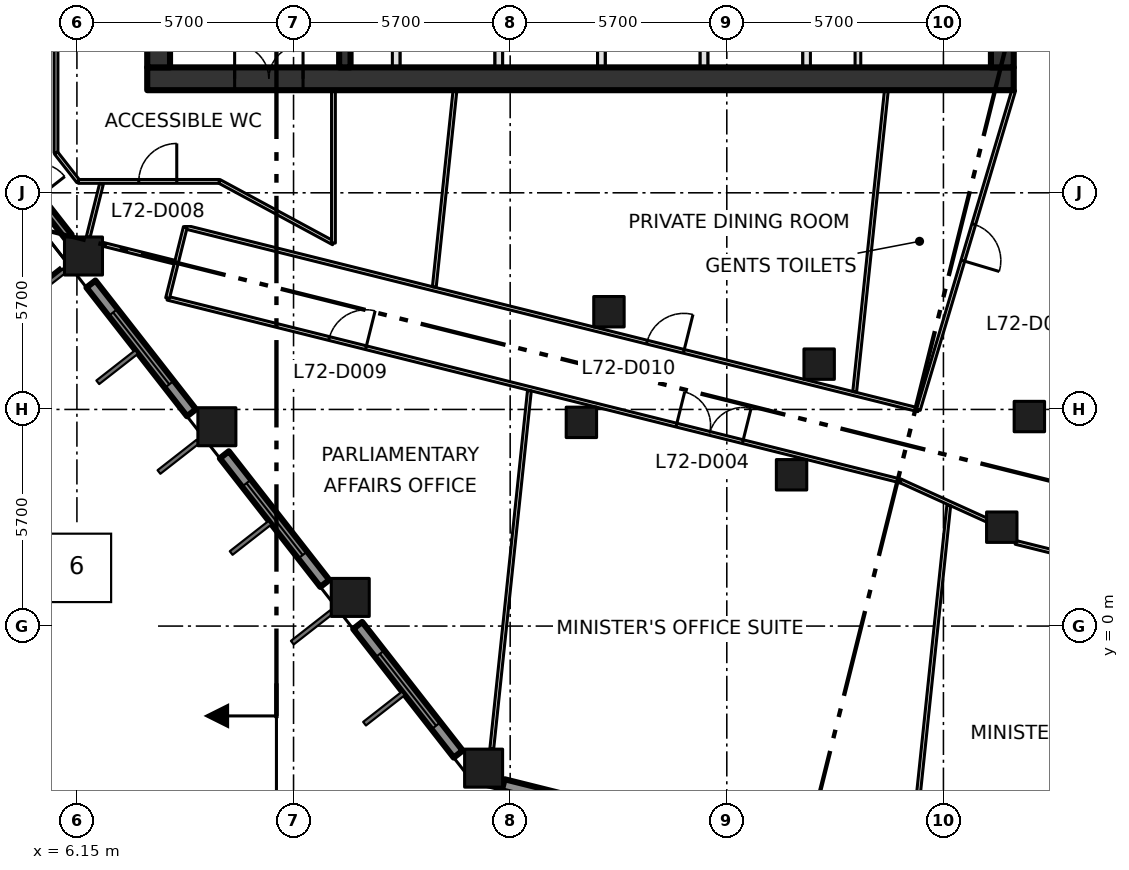
"""IFC4 building model, lengths in metres.
Left out: names, types, materials, properties, quantities, classifications, styles, units other than length and angle.
Written with IfcOpenShell. Run it as: python <this file> out.ifc"""

import sys

from ifc_helpers import new_model, si_unit, direction, frame, frame_2d, origin, origin_2d, place, context, subcontext, project, spatial, rectangle, extrude, element, fill, save


model = new_model("IFC4")
c1 = context("Model", 3, precision=1e-05, world=origin(), true_north=direction((0.0, 1.0)))
c2 = subcontext(c1, "Body", "Model", "MODEL_VIEW")
j1 = project(units=[si_unit("LENGTHUNIT", "METRE"), si_unit("PLANEANGLEUNIT", "RADIAN")], contexts=[c1])
p1 = place(None, origin())
s1 = spatial("IfcSite", under=j1, at=p1, CompositionType="ELEMENT")
p2 = place(p1, origin())
s2 = spatial("IfcBuilding", under=s1, at=p2, CompositionType="ELEMENT")
p3 = place(p2, frame((0.0, 0.0, 315.0)))
s3 = spatial("IfcBuildingStorey", under=s2, at=p3, CompositionType="ELEMENT", Elevation=315.0)
for number, where, z_axis, x_axis in (
    (1, (16.851, -3.738, 0.0), (0.0, 0.0, 1.0), (1.0, 0.0, 0.0)),
    (2, (13.342, 0.754, 0.0), (0.0, 0.0, 1.0), (1.0, 0.0, 0.0)),
    (3, (9.833, 5.245, 0.0), (0.0, 0.0, 1.0), (1.0, 0.0, 0.0)),
    (4, (6.323, 9.737, 0.0), (0.0, 0.0, 1.0), (1.0, 0.0, 0.0)),
):
    element("IfcColumn", number, at=place(p3, frame(where, z_axis=z_axis, x_axis=x_axis)), inside=s3, PredefinedType="COLUMN", context=c2, shape_type="SweptSolid", body=[
        extrude(rectangle(XDim=1.0, YDim=1.0, at=origin_2d()), origin(), (0.0, 0.0, 1.0), 4.2),
    ])
for number, where, z_axis, x_axis in (
    (5, (19.424, 5.36, 0.0), (0.0, 0.0, 1.0), (1.0, 0.0, 0.0)),
    (6, (24.954, 3.981, 0.0), (0.0, 0.0, 1.0), (1.0, 0.0, 0.0)),
    (7, (30.485, 2.602, 0.0), (0.0, 0.0, 1.0), (1.0, 0.0, 0.0)),
    (8, (20.149, 8.271, 0.0), (0.0, 0.0, 1.0), (1.0, 0.0, 0.0)),
    (9, (25.68, 6.892, 0.0), (0.0, 0.0, 1.0), (1.0, 0.0, 0.0)),
    (10, (31.211, 5.513, 0.0), (0.0, 0.0, 1.0), (1.0, 0.0, 0.0)),
):
    element("IfcColumn", number, at=place(p3, frame(where, z_axis=z_axis, x_axis=x_axis)), inside=s3, PredefinedType="COLUMN", context=c2, shape_type="SweptSolid", body=[
        extrude(rectangle(XDim=0.8, YDim=0.8, at=origin_2d()), origin(), (0.0, 0.0, 1.0), 4.2),
    ])
p4 = place(p3, frame((8.0, 14.4, -0.3), z_axis=(0.0, 0.0, 1.0), x_axis=(1.0, 0.0, 0.0)))
e11 = element("IfcWall", 11, at=p4, inside=s3, PredefinedType="SHEAR", context=c2, shape_type="SweptSolid", body=[
    extrude(rectangle(XDim=22.8, YDim=0.6, at=frame_2d((11.4, 0.0))), origin(), (0.0, 0.0, 1.0), 4.2),
])
p5 = place(p4, frame((2.3, 0.0, 0.3)))
e12 = element("IfcOpeningElement", 12, at=p5, cuts=e11, PredefinedType="OPENING", context=c2, shape_type="SweptSolid", body=[
    extrude(rectangle(XDim=1.8, YDim=2.1, at=frame_2d((0.9, 1.05))), frame((0.0, 0.31, 0.0), z_axis=(0.0, -1.0, 0.0), x_axis=(1.0, 0.0, 0.0)), (0.0, 0.0, 1.0), 0.62),
])
for number, where, z_axis, x_axis in (
    (13, (8.3, 14.7, -0.3), (0.0, 0.0, 1.0), (0.0, 1.0, 0.0)),
    (14, (30.5, 14.7, -0.3), (0.0, 0.0, 1.0), (0.0, 1.0, 0.0)),
):
    element("IfcWall", number, at=place(p3, frame(where, z_axis=z_axis, x_axis=x_axis)), inside=s3, PredefinedType="SHEAR", context=c2, shape_type="SweptSolid", body=[
        extrude(rectangle(XDim=21.0, YDim=0.6, at=frame_2d((10.5, 0.0))), origin(), (0.0, 0.0, 1.0), 4.2),
    ])
p6 = place(p3, frame((13.2, 14.7, 0.0), z_axis=(0.0, 0.0, 1.0), x_axis=(0.0, 1.0, 0.0)))
e15 = element("IfcWall", 15, at=p6, inside=s3, PredefinedType="SHEAR", context=c2, shape_type="SweptSolid", body=[
    extrude(rectangle(XDim=21.0, YDim=0.3, at=frame_2d((10.5, 0.0))), origin(), (0.0, 0.0, 1.0), 3.9),
])
p7 = place(p6, frame((3.6, 0.0, 0.0)))
e16 = element("IfcOpeningElement", 16, at=p7, cuts=e15, PredefinedType="OPENING", context=c2, shape_type="SweptSolid", body=[
    extrude(rectangle(XDim=1.8, YDim=2.1, at=frame_2d((0.9, 1.05))), frame((0.0, 0.16, 0.0), z_axis=(0.0, -1.0, 0.0), x_axis=(1.0, 0.0, 0.0)), (0.0, 0.0, 1.0), 0.32),
])
p8 = place(p6, frame((11.7, 0.0, 0.0)))
e17 = element("IfcOpeningElement", 17, at=p8, cuts=e15, PredefinedType="OPENING", context=c2, shape_type="SweptSolid", body=[
    extrude(rectangle(XDim=1.2, YDim=2.1, at=frame_2d((0.6, 1.05))), frame((0.0, 0.16, 0.0), z_axis=(0.0, -1.0, 0.0), x_axis=(1.0, 0.0, 0.0)), (0.0, 0.0, 1.0), 0.32),
])
for number, where, z_axis, x_axis in (
    (18, (14.55, 14.7, 0.0), (0.0, 0.0, 1.0), (0.0, 1.0, 0.0)),
    (19, (17.25, 14.7, 0.0), (0.0, 0.0, 1.0), (0.0, 1.0, 0.0)),
    (20, (19.95, 14.7, 0.0), (0.0, 0.0, 1.0), (0.0, 1.0, 0.0)),
    (21, (22.65, 14.7, 0.0), (0.0, 0.0, 1.0), (0.0, 1.0, 0.0)),
    (22, (25.35, 14.7, 0.0), (0.0, 0.0, 1.0), (0.0, 1.0, 0.0)),
):
    element("IfcWall", number, at=place(p3, frame(where, z_axis=z_axis, x_axis=x_axis)), inside=s3, PredefinedType="SOLIDWALL", context=c2, shape_type="SweptSolid", body=[
        extrude(rectangle(XDim=2.9, YDim=0.2, at=frame_2d((1.45, 0.0))), origin(), (0.0, 0.0, 1.0), 3.9),
    ])
p9 = place(p3, frame((26.7, 14.7, 0.0), z_axis=(0.0, 0.0, 1.0), x_axis=(0.0, 1.0, 0.0)))
e23 = element("IfcWall", 23, at=p9, inside=s3, PredefinedType="PARTITIONING", context=c2, shape_type="SweptSolid", body=[
    extrude(rectangle(XDim=2.9, YDim=0.15, at=frame_2d((1.45, 0.0))), origin(), (0.0, 0.0, 1.0), 3.9),
])
p10 = place(p3, frame((3.205, 13.729, 0.0), z_axis=(0.0, 0.0, 1.0), x_axis=(0.615636557784, -0.788030220689, 0.0)))
e24 = element("IfcWall", 24, at=p10, inside=s3, PredefinedType="SOLIDWALL", context=c2, shape_type="SweptSolid", body=[
    extrude(rectangle(XDim=4.431, YDim=0.2, at=frame_2d((2.216, 0.0))), origin(), (0.0, 0.0, 1.0), 3.2),
])
p11 = place(p10, frame((1.315, 0.0, 0.0)))
e25 = element("IfcOpeningElement", 25, at=p11, cuts=e24, PredefinedType="OPENING", context=c2, shape_type="SweptSolid", body=[
    extrude(rectangle(XDim=1.8, YDim=2.9, at=frame_2d((0.9, 1.45))), frame((0.0, 0.11, 0.0), z_axis=(0.0, -1.0, 0.0), x_axis=(1.0, 0.0, 0.0)), (0.0, 0.0, 1.0), 0.22),
])
p12 = place(p3, frame((6.519, 9.0, 0.0), z_axis=(0.0, 0.0, 1.0), x_axis=(0.615634121154, -0.788032124263, 0.0)))
e26 = element("IfcWall", 26, at=p12, inside=s3, PredefinedType="SOLIDWALL", context=c2, shape_type="SweptSolid", body=[
    extrude(rectangle(XDim=4.298, YDim=0.3, at=frame_2d((2.149, 0.0))), origin(), (0.0, 0.0, 1.0), 3.2),
])
p13 = place(p12, frame((0.949, 0.0, 0.8)))
e27 = element("IfcOpeningElement", 27, at=p13, cuts=e26, PredefinedType="OPENING", context=c2, shape_type="SweptSolid", body=[
    extrude(rectangle(XDim=2.4, YDim=2.1, at=frame_2d((1.2, 1.05))), frame((0.0, 0.16, 0.0), z_axis=(0.0, -1.0, 0.0), x_axis=(1.0, 0.0, 0.0)), (0.0, 0.0, 1.0), 0.32),
])
p14 = place(p3, frame((10.029, 4.507, 0.0), z_axis=(0.0, 0.0, 1.0), x_axis=(0.615572343689, -0.788080382756, 0.0)))
e28 = element("IfcWall", 28, at=p14, inside=s3, PredefinedType="SOLIDWALL", context=c2, shape_type="SweptSolid", body=[
    extrude(rectangle(XDim=4.295, YDim=0.3, at=frame_2d((2.147, 0.0))), origin(), (0.0, 0.0, 1.0), 3.2),
])
p15 = place(p14, frame((0.948, 0.0, 0.8)))
e29 = element("IfcOpeningElement", 29, at=p15, cuts=e28, PredefinedType="OPENING", context=c2, shape_type="SweptSolid", body=[
    extrude(rectangle(XDim=2.4, YDim=2.1, at=frame_2d((1.2, 1.05))), frame((0.0, 0.16, 0.0), z_axis=(0.0, -1.0, 0.0), x_axis=(1.0, 0.0, 0.0)), (0.0, 0.0, 1.0), 0.32),
])
p16 = place(p3, frame((13.538, 0.016, 0.0), z_axis=(0.0, 0.0, 1.0), x_axis=(0.615713519567, -0.787970089421, 0.0)))
e30 = element("IfcWall", 30, at=p16, inside=s3, PredefinedType="SOLIDWALL", context=c2, shape_type="SweptSolid", body=[
    extrude(rectangle(XDim=4.296, YDim=0.3, at=frame_2d((2.148, 0.0))), origin(), (0.0, 0.0, 1.0), 3.2),
])
p17 = place(p16, frame((0.948, 0.0, 0.8)))
e31 = element("IfcOpeningElement", 31, at=p17, cuts=e30, PredefinedType="OPENING", context=c2, shape_type="SweptSolid", body=[
    extrude(rectangle(XDim=2.4, YDim=2.1, at=frame_2d((1.2, 1.05))), frame((0.0, 0.16, 0.0), z_axis=(0.0, -1.0, 0.0), x_axis=(1.0, 0.0, 0.0)), (0.0, 0.0, 1.0), 0.32),
])
p18 = place(p3, frame((17.367, -4.176, 0.0), z_axis=(0.0, 0.0, 1.0), x_axis=(0.970327846266, -0.241793032904, 0.0)))
e32 = element("IfcWall", 32, at=p18, inside=s3, PredefinedType="SOLIDWALL", context=c2, shape_type="SweptSolid", body=[
    extrude(rectangle(XDim=4.487, YDim=0.3, at=frame_2d((2.244, 0.0))), origin(), (0.0, 0.0, 1.0), 3.2),
])
p19 = place(p18, frame((1.044, 0.0, 0.8)))
e33 = element("IfcOpeningElement", 33, at=p19, cuts=e32, PredefinedType="OPENING", context=c2, shape_type="SweptSolid", body=[
    extrude(rectangle(XDim=2.4, YDim=2.1, at=frame_2d((1.2, 1.05))), frame((0.0, 0.16, 0.0), z_axis=(0.0, -1.0, 0.0), x_axis=(1.0, 0.0, 0.0)), (0.0, 0.0, 1.0), 0.32),
])
p20 = place(p3, frame((5.6, 12.45, 0.0), z_axis=(0.0, 0.0, 1.0), x_axis=(0.0, 1.0, 0.0)))
e34 = element("IfcWall", 34, at=p20, inside=s3, PredefinedType="PARTITIONING", context=c2, shape_type="SweptSolid", body=[
    extrude(rectangle(XDim=26.85, YDim=0.1, at=frame_2d((13.425, 0.0))), origin(), (0.0, 0.0, 1.0), 3.9),
])
p21 = place(p20, frame((5.38, 0.0, 0.0)))
e35 = element("IfcOpeningElement", 35, at=p21, cuts=e34, PredefinedType="OPENING", context=c2, shape_type="SweptSolid", body=[
    extrude(rectangle(XDim=1.0, YDim=2.1, at=frame_2d((0.5, 1.05))), frame((0.0, 0.06, 0.0), z_axis=(0.0, -1.0, 0.0), x_axis=(1.0, 0.0, 0.0)), (0.0, 0.0, 1.0), 0.12),
])
p22 = place(p20, frame((16.639, 0.0, 0.0)))
e36 = element("IfcOpeningElement", 36, at=p22, cuts=e34, PredefinedType="OPENING", context=c2, shape_type="SweptSolid", body=[
    extrude(rectangle(XDim=1.0, YDim=2.1, at=frame_2d((0.5, 1.05))), frame((0.0, 0.06, 0.0), z_axis=(0.0, -1.0, 0.0), x_axis=(1.0, 0.0, 0.0)), (0.0, 0.0, 1.0), 0.12),
])
p23 = place(p20, frame((24.139, 0.0, 0.0)))
e37 = element("IfcOpeningElement", 37, at=p23, cuts=e34, PredefinedType="OPENING", context=c2, shape_type="SweptSolid", body=[
    extrude(rectangle(XDim=1.0, YDim=2.1, at=frame_2d((0.5, 1.05))), frame((0.0, 0.06, 0.0), z_axis=(0.0, -1.0, 0.0), x_axis=(1.0, 0.0, 0.0)), (0.0, 0.0, 1.0), 0.12),
])
p24 = place(p3, frame((5.6, 12.45, 0.0), z_axis=(0.0, 0.0, 1.0), x_axis=(0.615644041972, -0.788024373725, 0.0)))
e38 = element("IfcWall", 38, at=p24, inside=s3, PredefinedType="PARTITIONING", context=c2, shape_type="SweptSolid", body=[
    extrude(rectangle(XDim=0.952, YDim=0.1, at=frame_2d((0.476, 0.0))), origin(), (0.0, 0.0, 1.0), 3.9),
])
p25 = place(p3, frame((6.186, 11.7, 0.0), z_axis=(0.0, 0.0, 1.0), x_axis=(1.0, 0.0, 0.0)))
e39 = element("IfcWall", 39, at=p25, inside=s3, PredefinedType="PARTITIONING", context=c2, shape_type="SweptSolid", body=[
    extrude(rectangle(XDim=3.714, YDim=0.1, at=frame_2d((1.857, 0.0))), origin(), (0.0, 0.0, 1.0), 3.9),
])
p26 = place(p25, frame((1.591, 0.0, 0.0)))
e40 = element("IfcOpeningElement", 40, at=p26, cuts=e39, PredefinedType="OPENING", context=c2, shape_type="SweptSolid", body=[
    extrude(rectangle(XDim=1.0, YDim=2.1, at=frame_2d((0.5, 1.05))), frame((0.0, 0.06, 0.0), z_axis=(0.0, -1.0, 0.0), x_axis=(1.0, 0.0, 0.0)), (0.0, 0.0, 1.0), 0.12),
])
p27 = place(p3, frame((8.535, 8.626, 0.0), z_axis=(0.0, 0.0, 1.0), x_axis=(0.970298340477, -0.241911410372, 0.0)))
e41 = element("IfcWall", 41, at=p27, inside=s3, PredefinedType="PARTITIONING", context=c2, shape_type="SweptSolid", body=[
    extrude(rectangle(XDim=19.88, YDim=0.1, at=frame_2d((9.94, 0.0))), origin(), (0.0, 0.0, 1.0), 3.9),
])
p28 = place(p27, frame((13.799, 0.0, 0.0)))
e42 = element("IfcOpeningElement", 42, at=p28, cuts=e41, PredefinedType="OPENING", context=c2, shape_type="SweptSolid", body=[
    extrude(rectangle(XDim=1.8, YDim=2.1, at=frame_2d((0.9, 1.05))), frame((0.0, 0.06, 0.0), z_axis=(0.0, -1.0, 0.0), x_axis=(1.0, 0.0, 0.0)), (0.0, 0.0, 1.0), 0.12),
])
p29 = place(p27, frame((4.38, 0.0, 0.0)))
e43 = element("IfcOpeningElement", 43, at=p29, cuts=e41, PredefinedType="OPENING", context=c2, shape_type="SweptSolid", body=[
    extrude(rectangle(XDim=1.0, YDim=2.1, at=frame_2d((0.5, 1.05))), frame((0.0, 0.06, 0.0), z_axis=(0.0, -1.0, 0.0), x_axis=(1.0, 0.0, 0.0)), (0.0, 0.0, 1.0), 0.12),
])
p30 = place(p3, frame((9.002, 10.499, 0.0), z_axis=(0.0, 0.0, 1.0), x_axis=(0.970298340477, -0.241911410372, 0.0)))
e44 = element("IfcWall", 44, at=p30, inside=s3, PredefinedType="PARTITIONING", context=c2, shape_type="SweptSolid", body=[
    extrude(rectangle(XDim=19.88, YDim=0.1, at=frame_2d((9.94, 0.0))), origin(), (0.0, 0.0, 1.0), 3.9),
])
p31 = place(p30, frame((12.518, 0.0, 0.0)))
e45 = element("IfcOpeningElement", 45, at=p31, cuts=e44, PredefinedType="OPENING", context=c2, shape_type="SweptSolid", body=[
    extrude(rectangle(XDim=1.0, YDim=2.1, at=frame_2d((0.5, 1.05))), frame((0.0, 0.06, 0.0), z_axis=(0.0, -1.0, 0.0), x_axis=(1.0, 0.0, 0.0)), (0.0, 0.0, 1.0), 0.12),
])
p32 = place(p3, frame((9.002, 10.499, 0.0), z_axis=(0.0, 0.0, 1.0), x_axis=(-0.241940418317, -0.970291107856, 0.0)))
e46 = element("IfcWall", 46, at=p32, inside=s3, PredefinedType="PARTITIONING", context=c2, shape_type="SweptSolid", body=[
    extrude(rectangle(XDim=1.93, YDim=0.1, at=frame_2d((0.965, 0.0))), origin(), (0.0, 0.0, 1.0), 3.9),
])
p33 = place(p3, frame((9.9, 11.7, 0.0), z_axis=(0.0, 0.0, 1.0), x_axis=(0.87965147249, -0.475618846291, 0.0)))
e47 = element("IfcWall", 47, at=p33, inside=s3, PredefinedType="PARTITIONING", context=c2, shape_type="SweptSolid", body=[
    extrude(rectangle(XDim=3.41, YDim=0.1, at=frame_2d((1.705, 0.0))), origin(), (0.0, 0.0, 1.0), 3.9),
])
p34 = place(p3, frame((12.9, 10.078, 0.0), z_axis=(0.0, 0.0, 1.0), x_axis=(0.0, 1.0, 0.0)))
e48 = element("IfcWall", 48, at=p34, inside=s3, PredefinedType="PARTITIONING", context=c2, shape_type="SweptSolid", body=[
    extrude(rectangle(XDim=4.022, YDim=0.1, at=frame_2d((2.011, 0.0))), origin(), (0.0, 0.0, 1.0), 3.9),
])
p35 = place(p3, frame((27.824, 3.817, 0.0), z_axis=(0.0, 0.0, 1.0), x_axis=(0.910793734201, -0.41286168839, 0.0)))
e49 = element("IfcWall", 49, at=p35, inside=s3, PredefinedType="PARTITIONING", context=c2, shape_type="SweptSolid", body=[
    extrude(rectangle(XDim=2.482, YDim=0.1, at=frame_2d((1.241, 0.0))), origin(), (0.0, 0.0, 1.0), 3.9),
])
p36 = place(p3, frame((30.8, 14.1, 0.0), z_axis=(0.0, 0.0, 1.0), x_axis=(-0.28588265334, -0.958264633867, 0.0)))
e50 = element("IfcWall", 50, at=p36, inside=s3, PredefinedType="PARTITIONING", context=c2, shape_type="SweptSolid", body=[
    extrude(rectangle(XDim=8.776, YDim=0.1, at=frame_2d((4.388, 0.0))), origin(), (0.0, 0.0, 1.0), 3.9),
])
p37 = place(p36, frame((3.68, 0.0, 0.0)))
e51 = element("IfcOpeningElement", 51, at=p37, cuts=e50, PredefinedType="OPENING", context=c2, shape_type="SweptSolid", body=[
    extrude(rectangle(XDim=1.0, YDim=2.1, at=frame_2d((0.5, 1.05))), frame((0.0, 0.06, 0.0), z_axis=(0.0, -1.0, 0.0), x_axis=(1.0, 0.0, 0.0)), (0.0, 0.0, 1.0), 0.12),
])
p38 = place(p3, frame((30.849, 2.202, 0.0), z_axis=(0.0, 0.0, 1.0), x_axis=(0.970320559999, -0.241822271189, 0.0)))
e52 = element("IfcWall", 52, at=p38, inside=s3, PredefinedType="PARTITIONING", context=c2, shape_type="SweptSolid", body=[
    extrude(rectangle(XDim=4.913, YDim=0.1, at=frame_2d((2.456, 0.0))), origin(), (0.0, 0.0, 1.0), 3.9),
])
p39 = place(p3, frame((6.797, 11.638, 0.0), z_axis=(0.0, 0.0, 1.0), x_axis=(-0.242456058691, -0.970162388265, 0.0)))
e53 = element("IfcWall", 53, at=p39, inside=s3, PredefinedType="PARTITIONING", context=c2, shape_type="SweptSolid", body=[
    extrude(rectangle(XDim=1.444, YDim=0.1, at=frame_2d((0.722, 0.0))), origin(), (0.0, 0.0, 1.0), 3.9),
])
p40 = place(p3, frame((8.72, 9.575, 0.0), z_axis=(0.0, 0.0, 1.0), x_axis=(-0.970274576003, 0.242006708918, 0.0)))
e54 = element("IfcWall", 54, at=p40, inside=s3, PredefinedType="PARTITIONING", context=c2, shape_type="SweptSolid", body=[
    extrude(rectangle(XDim=1.955, YDim=0.1, at=frame_2d((0.978, 0.0))), origin(), (0.0, 0.0, 1.0), 3.9),
])
p41 = place(p3, frame((15.554, 8.924, 0.0), z_axis=(0.0, 0.0, 1.0), x_axis=(0.104513853303, 0.994523430829, 0.0)))
e55 = element("IfcWall", 55, at=p41, inside=s3, PredefinedType="PARTITIONING", context=c2, shape_type="SweptSolid", body=[
    extrude(rectangle(XDim=5.205, YDim=0.1, at=frame_2d((2.602, 0.0))), origin(), (0.0, 0.0, 1.0), 3.9),
])
p42 = place(p3, frame((17.065, -3.238, 0.0), z_axis=(0.0, 0.0, 1.0), x_axis=(0.104487801341, 0.994526168269, 0.0)))
e56 = element("IfcWall", 56, at=p42, inside=s3, PredefinedType="PARTITIONING", context=c2, shape_type="SweptSolid", body=[
    extrude(rectangle(XDim=9.484, YDim=0.1, at=frame_2d((4.742, 0.0))), origin(), (0.0, 0.0, 1.0), 3.9),
])
p43 = place(p3, frame((26.615, 6.166, 0.0), z_axis=(0.0, 0.0, 1.0), x_axis=(0.10453822663, 0.994520869149, 0.0)))
e57 = element("IfcWall", 57, at=p43, inside=s3, PredefinedType="PARTITIONING", context=c2, shape_type="SweptSolid", body=[
    extrude(rectangle(XDim=7.978, YDim=0.1, at=frame_2d((3.989, 0.0))), origin(), (0.0, 0.0, 1.0), 3.9),
])
p44 = place(p3, frame((28.127, -5.996, 0.0), z_axis=(0.0, 0.0, 1.0), x_axis=(0.104490376754, 0.994525897685, 0.0)))
e58 = element("IfcWall", 58, at=p44, inside=s3, PredefinedType="PARTITIONING", context=c2, shape_type="SweptSolid", body=[
    extrude(rectangle(XDim=9.218, YDim=0.1, at=frame_2d((4.609, 0.0))), origin(), (0.0, 0.0, 1.0), 3.9),
])
p45 = place(p5, origin())
e59 = element("IfcDoor", 59, at=p45, inside=s3, OperationType="DOUBLE_DOOR_SINGLE_SWING", PredefinedType="DOOR", context=c2, shape_type="SweptSolid", body=[
    extrude(rectangle(XDim=1.8, YDim=2.1, at=frame_2d((0.9, 1.05))), frame((0.0, 0.025, 0.0), z_axis=(0.0, -1.0, 0.0), x_axis=(1.0, 0.0, 0.0)), (0.0, 0.0, 1.0), 0.05),
])
fill(e12, e59)
p46 = place(p13, origin())
e60 = element("IfcWindow", 60, at=p46, inside=s3, PartitioningType="DOUBLE_PANEL_VERTICAL", PredefinedType="WINDOW", context=c2, shape_type="SweptSolid", body=[
    extrude(rectangle(XDim=2.4, YDim=2.1, at=frame_2d((1.2, 1.05))), frame((0.0, 0.03, 0.0), z_axis=(0.0, -1.0, 0.0), x_axis=(1.0, 0.0, 0.0)), (0.0, 0.0, 1.0), 0.06),
])
fill(e27, e60)
p47 = place(p15, origin())
e61 = element("IfcWindow", 61, at=p47, inside=s3, PartitioningType="DOUBLE_PANEL_VERTICAL", PredefinedType="WINDOW", context=c2, shape_type="SweptSolid", body=[
    extrude(rectangle(XDim=2.4, YDim=2.1, at=frame_2d((1.2, 1.05))), frame((0.0, 0.03, 0.0), z_axis=(0.0, -1.0, 0.0), x_axis=(1.0, 0.0, 0.0)), (0.0, 0.0, 1.0), 0.06),
])
fill(e29, e61)
p48 = place(p17, origin())
e62 = element("IfcWindow", 62, at=p48, inside=s3, PartitioningType="DOUBLE_PANEL_VERTICAL", PredefinedType="WINDOW", context=c2, shape_type="SweptSolid", body=[
    extrude(rectangle(XDim=2.4, YDim=2.1, at=frame_2d((1.2, 1.05))), frame((0.0, 0.03, 0.0), z_axis=(0.0, -1.0, 0.0), x_axis=(1.0, 0.0, 0.0)), (0.0, 0.0, 1.0), 0.06),
])
fill(e31, e62)
p49 = place(p28, origin())
e63 = element("IfcDoor", 63, at=p49, inside=s3, OperationType="DOUBLE_DOOR_SINGLE_SWING", PredefinedType="DOOR", context=c2, shape_type="SweptSolid", body=[
    extrude(rectangle(XDim=1.8, YDim=2.1, at=frame_2d((0.9, 1.05))), frame((0.0, 0.025, 0.0), z_axis=(0.0, -1.0, 0.0), x_axis=(1.0, 0.0, 0.0)), (0.0, 0.0, 1.0), 0.05),
])
fill(e42, e63)
p50 = place(p26, origin())
e64 = element("IfcDoor", 64, at=p50, inside=s3, OperationType="SINGLE_SWING_RIGHT", PredefinedType="DOOR", context=c2, shape_type="SweptSolid", body=[
    extrude(rectangle(XDim=1.0, YDim=2.1, at=frame_2d((0.5, 1.05))), frame((0.0, 0.025, 0.0), z_axis=(0.0, -1.0, 0.0), x_axis=(1.0, 0.0, 0.0)), (0.0, 0.0, 1.0), 0.05),
])
fill(e40, e64)
p51 = place(p29, origin())
e65 = element("IfcDoor", 65, at=p51, inside=s3, OperationType="SINGLE_SWING_RIGHT", PredefinedType="DOOR", context=c2, shape_type="SweptSolid", body=[
    extrude(rectangle(XDim=1.0, YDim=2.1, at=frame_2d((0.5, 1.05))), frame((0.0, 0.025, 0.0), z_axis=(0.0, -1.0, 0.0), x_axis=(1.0, 0.0, 0.0)), (0.0, 0.0, 1.0), 0.05),
])
fill(e43, e65)
p52 = place(p31, origin())
e66 = element("IfcDoor", 66, at=p52, inside=s3, OperationType="SINGLE_SWING_RIGHT", PredefinedType="DOOR", context=c2, shape_type="SweptSolid", body=[
    extrude(rectangle(XDim=1.0, YDim=2.1, at=frame_2d((0.5, 1.05))), frame((0.0, 0.025, 0.0), z_axis=(0.0, -1.0, 0.0), x_axis=(1.0, 0.0, 0.0)), (0.0, 0.0, 1.0), 0.05),
])
fill(e45, e66)
p53 = place(p37, origin())
e67 = element("IfcDoor", 67, at=p53, inside=s3, OperationType="SINGLE_SWING_RIGHT", PredefinedType="DOOR", context=c2, shape_type="SweptSolid", body=[
    extrude(rectangle(XDim=1.0, YDim=2.1, at=frame_2d((0.5, 1.05))), frame((0.0, 0.025, 0.0), z_axis=(0.0, -1.0, 0.0), x_axis=(1.0, 0.0, 0.0)), (0.0, 0.0, 1.0), 0.05),
])
fill(e51, e67)
save(model, sys.argv[1])
